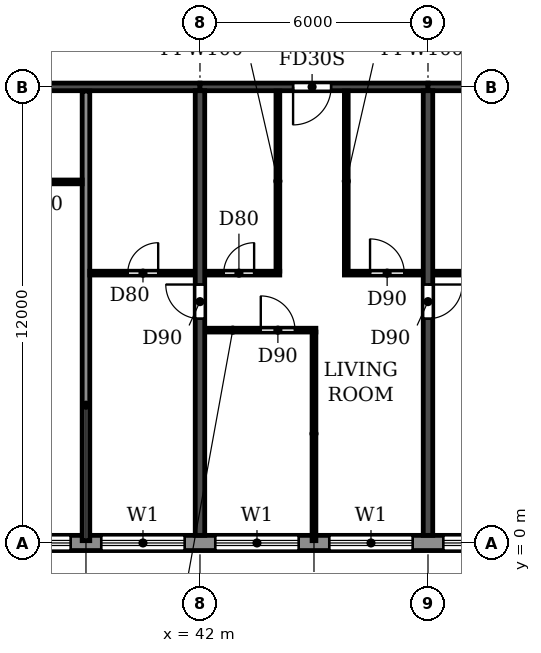
"""IFC4 building model, lengths in metres.
Left out: names, types, materials, properties, quantities, classifications, styles, units other than length and angle.
Written with IfcOpenShell. Run it as: python <this file> out.ifc"""

import sys

from ifc_helpers import new_model, si_unit, direction, frame, frame_2d, origin, place, context, subcontext, project, spatial, rectangle, extrude, element, fill, save


model = new_model("IFC4")
c1 = context("Model", 3, precision=1e-05, world=origin(), true_north=direction((0.0, 1.0)))
c2 = subcontext(c1, "Body", "Model", "MODEL_VIEW")
j1 = project(units=[si_unit("LENGTHUNIT", "METRE"), si_unit("PLANEANGLEUNIT", "RADIAN")], contexts=[c1])
p1 = place(None, origin())
s1 = spatial("IfcSite", under=j1, at=p1, CompositionType="ELEMENT")
p2 = place(p1, origin())
s2 = spatial("IfcBuilding", under=s1, at=p2, CompositionType="ELEMENT")
p3 = place(p2, frame((0.0, 0.0, 181.8)))
s3 = spatial("IfcBuildingStorey", under=s2, at=p3, CompositionType="ELEMENT", Elevation=181.8)
p4 = place(p3, frame((42.0, 0.2, 0.0), z_axis=(0.0, 0.0, 1.0), x_axis=(0.0, 1.0, 0.0)))
e1 = element("IfcWall", 1, at=p4, inside=s3, PredefinedType="SHEAR", context=c2, shape_type="SweptSolid", body=[
    extrude(rectangle(XDim=11.7, YDim=0.25, at=frame_2d((5.85, 0.0))), origin(), (0.0, 0.0, 1.0), 3.08),
])
p5 = place(p4, frame((5.7, 0.0, 0.0)))
e2 = element("IfcOpeningElement", 2, at=p5, cuts=e1, PredefinedType="OPENING", context=c2, shape_type="SweptSolid", body=[
    extrude(rectangle(XDim=0.9, YDim=2.1, at=frame_2d((0.45, 1.05))), frame((0.0, 0.135, 0.0), z_axis=(0.0, -1.0, 0.0), x_axis=(1.0, 0.0, 0.0)), (0.0, 0.0, 1.0), 0.27),
])
p6 = place(p3, frame((48.0, 0.2, 0.0), z_axis=(0.0, 0.0, 1.0), x_axis=(0.0, 1.0, 0.0)))
e3 = element("IfcWall", 3, at=p6, inside=s3, PredefinedType="SHEAR", context=c2, shape_type="SweptSolid", body=[
    extrude(rectangle(XDim=11.7, YDim=0.25, at=frame_2d((5.85, 0.0))), origin(), (0.0, 0.0, 1.0), 3.08),
])
p7 = place(p6, frame((5.7, 0.0, 0.0)))
e4 = element("IfcOpeningElement", 4, at=p7, cuts=e3, PredefinedType="OPENING", context=c2, shape_type="SweptSolid", body=[
    extrude(rectangle(XDim=0.9, YDim=2.1, at=frame_2d((0.45, 1.05))), frame((0.0, 0.135, 0.0), z_axis=(0.0, -1.0, 0.0), x_axis=(1.0, 0.0, 0.0)), (0.0, 0.0, 1.0), 0.27),
])
p8 = place(p3, frame((36.0, 12.0, 0.0), z_axis=(0.0, 0.0, 1.0), x_axis=(1.0, 0.0, 0.0)))
e5 = element("IfcWall", 5, at=p8, inside=s3, PredefinedType="SHEAR", context=c2, shape_type="SweptSolid", body=[
    extrude(rectangle(XDim=6.0, YDim=0.2, at=frame_2d((3.0, 0.0))), origin(), (0.0, 0.0, 1.0), 2.48),
])
p9 = place(p3, frame((42.0, 12.0, 0.0), z_axis=(0.0, 0.0, 1.0), x_axis=(1.0, 0.0, 0.0)))
e6 = element("IfcWall", 6, at=p9, inside=s3, PredefinedType="SHEAR", context=c2, shape_type="SweptSolid", body=[
    extrude(rectangle(XDim=6.0, YDim=0.2, at=frame_2d((3.0, 0.0))), origin(), (0.0, 0.0, 1.0), 2.48),
])
p10 = place(p9, frame((2.45, 0.0, 0.0)))
e7 = element("IfcOpeningElement", 7, at=p10, cuts=e6, PredefinedType="OPENING", context=c2, shape_type="SweptSolid", body=[
    extrude(rectangle(XDim=1.0, YDim=2.1, at=frame_2d((0.5, 1.05))), frame((0.0, 0.11, 0.0), z_axis=(0.0, -1.0, 0.0), x_axis=(1.0, 0.0, 0.0)), (0.0, 0.0, 1.0), 0.22),
])
p11 = place(p3, frame((48.0, 12.0, 0.0), z_axis=(0.0, 0.0, 1.0), x_axis=(1.0, 0.0, 0.0)))
e8 = element("IfcWall", 8, at=p11, inside=s3, PredefinedType="SHEAR", context=c2, shape_type="SweptSolid", body=[
    extrude(rectangle(XDim=6.0, YDim=0.2, at=frame_2d((3.0, 0.0))), origin(), (0.0, 0.0, 1.0), 2.48),
])
p12 = place(p3, frame((22.683, 0.0, 0.0), z_axis=(0.0, 0.0, 1.0), x_axis=(1.0, 0.0, 0.0)))
e9 = element("IfcWall", 9, at=p12, inside=s3, PredefinedType="STANDARD", context=c2, shape_type="SweptSolid", body=[
    extrude(rectangle(XDim=56.634, YDim=0.4, at=frame_2d((28.317, 0.0))), origin(), (0.0, 0.0, 1.0), 3.08),
])
p13 = place(p12, frame((1.717, 0.0, 0.9)))
e10 = element("IfcOpeningElement", 10, at=p13, cuts=e9, PredefinedType="OPENING", context=c2, shape_type="SweptSolid", body=[
    extrude(rectangle(XDim=2.2, YDim=1.5, at=frame_2d((1.1, 0.75))), frame((0.0, 0.21, 0.0), z_axis=(0.0, -1.0, 0.0), x_axis=(1.0, 0.0, 0.0)), (0.0, 0.0, 1.0), 0.42),
])
p14 = place(p12, frame((4.917, 0.0, 0.0)))
e11 = element("IfcOpeningElement", 11, at=p14, cuts=e9, PredefinedType="OPENING", context=c2, shape_type="SweptSolid", body=[
    extrude(rectangle(XDim=1.8, YDim=2.4, at=frame_2d((0.9, 1.2))), frame((0.0, 0.21, 0.0), z_axis=(0.0, -1.0, 0.0), x_axis=(1.0, 0.0, 0.0)), (0.0, 0.0, 1.0), 0.42),
])
p15 = place(p12, frame((7.717, 0.0, 0.9)))
e12 = element("IfcOpeningElement", 12, at=p15, cuts=e9, PredefinedType="OPENING", context=c2, shape_type="SweptSolid", body=[
    extrude(rectangle(XDim=2.2, YDim=1.5, at=frame_2d((1.1, 0.75))), frame((0.0, 0.21, 0.0), z_axis=(0.0, -1.0, 0.0), x_axis=(1.0, 0.0, 0.0)), (0.0, 0.0, 1.0), 0.42),
])
p16 = place(p12, frame((10.717, 0.0, 0.9)))
e13 = element("IfcOpeningElement", 13, at=p16, cuts=e9, PredefinedType="OPENING", context=c2, shape_type="SweptSolid", body=[
    extrude(rectangle(XDim=2.2, YDim=1.5, at=frame_2d((1.1, 0.75))), frame((0.0, 0.21, 0.0), z_axis=(0.0, -1.0, 0.0), x_axis=(1.0, 0.0, 0.0)), (0.0, 0.0, 1.0), 0.42),
])
p17 = place(p12, frame((13.717, 0.0, 0.9)))
e14 = element("IfcOpeningElement", 14, at=p17, cuts=e9, PredefinedType="OPENING", context=c2, shape_type="SweptSolid", body=[
    extrude(rectangle(XDim=2.2, YDim=1.5, at=frame_2d((1.1, 0.75))), frame((0.0, 0.21, 0.0), z_axis=(0.0, -1.0, 0.0), x_axis=(1.0, 0.0, 0.0)), (0.0, 0.0, 1.0), 0.42),
])
p18 = place(p12, frame((16.717, 0.0, 0.9)))
e15 = element("IfcOpeningElement", 15, at=p18, cuts=e9, PredefinedType="OPENING", context=c2, shape_type="SweptSolid", body=[
    extrude(rectangle(XDim=2.2, YDim=1.5, at=frame_2d((1.1, 0.75))), frame((0.0, 0.21, 0.0), z_axis=(0.0, -1.0, 0.0), x_axis=(1.0, 0.0, 0.0)), (0.0, 0.0, 1.0), 0.42),
])
p19 = place(p12, frame((19.717, 0.0, 0.9)))
e16 = element("IfcOpeningElement", 16, at=p19, cuts=e9, PredefinedType="OPENING", context=c2, shape_type="SweptSolid", body=[
    extrude(rectangle(XDim=2.2, YDim=1.5, at=frame_2d((1.1, 0.75))), frame((0.0, 0.21, 0.0), z_axis=(0.0, -1.0, 0.0), x_axis=(1.0, 0.0, 0.0)), (0.0, 0.0, 1.0), 0.42),
])
p20 = place(p12, frame((22.717, 0.0, 0.9)))
e17 = element("IfcOpeningElement", 17, at=p20, cuts=e9, PredefinedType="OPENING", context=c2, shape_type="SweptSolid", body=[
    extrude(rectangle(XDim=2.2, YDim=1.5, at=frame_2d((1.1, 0.75))), frame((0.0, 0.21, 0.0), z_axis=(0.0, -1.0, 0.0), x_axis=(1.0, 0.0, 0.0)), (0.0, 0.0, 1.0), 0.42),
])
p21 = place(p12, frame((25.717, 0.0, 0.9)))
e18 = element("IfcOpeningElement", 18, at=p21, cuts=e9, PredefinedType="OPENING", context=c2, shape_type="SweptSolid", body=[
    extrude(rectangle(XDim=2.2, YDim=1.5, at=frame_2d((1.1, 0.75))), frame((0.0, 0.21, 0.0), z_axis=(0.0, -1.0, 0.0), x_axis=(1.0, 0.0, 0.0)), (0.0, 0.0, 1.0), 0.42),
])
p22 = place(p12, frame((28.717, 0.0, 0.9)))
e19 = element("IfcOpeningElement", 19, at=p22, cuts=e9, PredefinedType="OPENING", context=c2, shape_type="SweptSolid", body=[
    extrude(rectangle(XDim=2.2, YDim=1.5, at=frame_2d((1.1, 0.75))), frame((0.0, 0.21, 0.0), z_axis=(0.0, -1.0, 0.0), x_axis=(1.0, 0.0, 0.0)), (0.0, 0.0, 1.0), 0.42),
])
p23 = place(p12, frame((31.717, 0.0, 0.9)))
e20 = element("IfcOpeningElement", 20, at=p23, cuts=e9, PredefinedType="OPENING", context=c2, shape_type="SweptSolid", body=[
    extrude(rectangle(XDim=2.2, YDim=1.5, at=frame_2d((1.1, 0.75))), frame((0.0, 0.21, 0.0), z_axis=(0.0, -1.0, 0.0), x_axis=(1.0, 0.0, 0.0)), (0.0, 0.0, 1.0), 0.42),
])
p24 = place(p12, frame((34.717, 0.0, 0.9)))
e21 = element("IfcOpeningElement", 21, at=p24, cuts=e9, PredefinedType="OPENING", context=c2, shape_type="SweptSolid", body=[
    extrude(rectangle(XDim=2.2, YDim=1.5, at=frame_2d((1.1, 0.75))), frame((0.0, 0.21, 0.0), z_axis=(0.0, -1.0, 0.0), x_axis=(1.0, 0.0, 0.0)), (0.0, 0.0, 1.0), 0.42),
])
p25 = place(p12, frame((37.917, 0.0, 0.0)))
e22 = element("IfcOpeningElement", 22, at=p25, cuts=e9, PredefinedType="OPENING", context=c2, shape_type="SweptSolid", body=[
    extrude(rectangle(XDim=1.8, YDim=2.4, at=frame_2d((0.9, 1.2))), frame((0.0, 0.21, 0.0), z_axis=(0.0, -1.0, 0.0), x_axis=(1.0, 0.0, 0.0)), (0.0, 0.0, 1.0), 0.42),
])
p26 = place(p12, frame((40.717, 0.0, 0.9)))
e23 = element("IfcOpeningElement", 23, at=p26, cuts=e9, PredefinedType="OPENING", context=c2, shape_type="SweptSolid", body=[
    extrude(rectangle(XDim=2.2, YDim=1.5, at=frame_2d((1.1, 0.75))), frame((0.0, 0.21, 0.0), z_axis=(0.0, -1.0, 0.0), x_axis=(1.0, 0.0, 0.0)), (0.0, 0.0, 1.0), 0.42),
])
p27 = place(p12, frame((43.717, 0.0, 0.9)))
e24 = element("IfcOpeningElement", 24, at=p27, cuts=e9, PredefinedType="OPENING", context=c2, shape_type="SweptSolid", body=[
    extrude(rectangle(XDim=2.2, YDim=1.5, at=frame_2d((1.1, 0.75))), frame((0.0, 0.21, 0.0), z_axis=(0.0, -1.0, 0.0), x_axis=(1.0, 0.0, 0.0)), (0.0, 0.0, 1.0), 0.42),
])
p28 = place(p12, frame((46.717, 0.0, 0.9)))
e25 = element("IfcOpeningElement", 25, at=p28, cuts=e9, PredefinedType="OPENING", context=c2, shape_type="SweptSolid", body=[
    extrude(rectangle(XDim=2.2, YDim=1.5, at=frame_2d((1.1, 0.75))), frame((0.0, 0.21, 0.0), z_axis=(0.0, -1.0, 0.0), x_axis=(1.0, 0.0, 0.0)), (0.0, 0.0, 1.0), 0.42),
])
p29 = place(p12, frame((49.917, 0.0, 0.0)))
e26 = element("IfcOpeningElement", 26, at=p29, cuts=e9, PredefinedType="OPENING", context=c2, shape_type="SweptSolid", body=[
    extrude(rectangle(XDim=1.8, YDim=2.4, at=frame_2d((0.9, 1.2))), frame((0.0, 0.21, 0.0), z_axis=(0.0, -1.0, 0.0), x_axis=(1.0, 0.0, 0.0)), (0.0, 0.0, 1.0), 0.42),
])
p30 = place(p12, frame((52.717, 0.0, 0.9)))
e27 = element("IfcOpeningElement", 27, at=p30, cuts=e9, PredefinedType="OPENING", context=c2, shape_type="SweptSolid", body=[
    extrude(rectangle(XDim=2.2, YDim=1.5, at=frame_2d((1.1, 0.75))), frame((0.0, 0.21, 0.0), z_axis=(0.0, -1.0, 0.0), x_axis=(1.0, 0.0, 0.0)), (0.0, 0.0, 1.0), 0.42),
])
p31 = place(p3, frame((39.0, 0.06, 0.0), z_axis=(0.0, 0.0, 1.0), x_axis=(0.0, 1.0, 0.0)))
e28 = element("IfcWall", 28, at=p31, inside=s3, PredefinedType="PARTITIONING", context=c2, shape_type="SweptSolid", body=[
    extrude(rectangle(XDim=11.83, YDim=0.2, at=frame_2d((5.915, 0.0))), origin(), (0.0, 0.0, 1.0), 3.08),
])
p32 = place(p3, frame((42.135, 5.6, 0.0), z_axis=(0.0, 0.0, 1.0), x_axis=(1.0, 0.0, 0.0)))
e29 = element("IfcWall", 29, at=p32, inside=s3, PredefinedType="PARTITIONING", context=c2, shape_type="SweptSolid", body=[
    extrude(rectangle(XDim=2.915, YDim=0.1, at=frame_2d((1.458, 0.0))), origin(), (0.0, 0.0, 1.0), 3.08),
])
p33 = place(p32, frame((1.465, 0.0, 0.0)))
e30 = element("IfcOpeningElement", 30, at=p33, cuts=e29, PredefinedType="OPENING", context=c2, shape_type="SweptSolid", body=[
    extrude(rectangle(XDim=0.9, YDim=2.1, at=frame_2d((0.45, 1.05))), frame((0.0, 0.06, 0.0), z_axis=(0.0, -1.0, 0.0), x_axis=(1.0, 0.0, 0.0)), (0.0, 0.0, 1.0), 0.12),
])
p34 = place(p3, frame((39.1, 7.1, 0.0), z_axis=(0.0, 0.0, 1.0), x_axis=(1.0, 0.0, 0.0)))
e31 = element("IfcWall", 31, at=p34, inside=s3, PredefinedType="PARTITIONING", context=c2, shape_type="SweptSolid", body=[
    extrude(rectangle(XDim=2.765, YDim=0.1, at=frame_2d((1.382, 0.0))), origin(), (0.0, 0.0, 1.0), 3.08),
])
p35 = place(p34, frame((1.0, 0.0, 0.0)))
e32 = element("IfcOpeningElement", 32, at=p35, cuts=e31, PredefinedType="OPENING", context=c2, shape_type="SweptSolid", body=[
    extrude(rectangle(XDim=0.8, YDim=2.1, at=frame_2d((0.4, 1.05))), frame((0.0, 0.06, 0.0), z_axis=(0.0, -1.0, 0.0), x_axis=(1.0, 0.0, 0.0)), (0.0, 0.0, 1.0), 0.12),
])
p36 = place(p3, frame((42.135, 7.1, 0.0), z_axis=(0.0, 0.0, 1.0), x_axis=(1.0, 0.0, 0.0)))
e33 = element("IfcWall", 33, at=p36, inside=s3, PredefinedType="PARTITIONING", context=c2, shape_type="SweptSolid", body=[
    extrude(rectangle(XDim=1.965, YDim=0.1, at=frame_2d((0.982, 0.0))), origin(), (0.0, 0.0, 1.0), 3.08),
])
p37 = place(p36, frame((0.49, 0.0, 0.0)))
e34 = element("IfcOpeningElement", 34, at=p37, cuts=e33, PredefinedType="OPENING", context=c2, shape_type="SweptSolid", body=[
    extrude(rectangle(XDim=0.8, YDim=2.1, at=frame_2d((0.4, 1.05))), frame((0.0, 0.06, 0.0), z_axis=(0.0, -1.0, 0.0), x_axis=(1.0, 0.0, 0.0)), (0.0, 0.0, 1.0), 0.12),
])
p38 = place(p3, frame((45.8, 7.1, 0.0), z_axis=(0.0, 0.0, 1.0), x_axis=(1.0, 0.0, 0.0)))
e35 = element("IfcWall", 35, at=p38, inside=s3, PredefinedType="PARTITIONING", context=c2, shape_type="SweptSolid", body=[
    extrude(rectangle(XDim=2.065, YDim=0.1, at=frame_2d((1.032, 0.0))), origin(), (0.0, 0.0, 1.0), 3.08),
])
p39 = place(p38, frame((0.675, 0.0, 0.0)))
e36 = element("IfcOpeningElement", 36, at=p39, cuts=e35, PredefinedType="OPENING", context=c2, shape_type="SweptSolid", body=[
    extrude(rectangle(XDim=0.9, YDim=2.1, at=frame_2d((0.45, 1.05))), frame((0.0, 0.06, 0.0), z_axis=(0.0, -1.0, 0.0), x_axis=(1.0, 0.0, 0.0)), (0.0, 0.0, 1.0), 0.12),
])
p40 = place(p3, frame((48.135, 7.1, 0.0), z_axis=(0.0, 0.0, 1.0), x_axis=(1.0, 0.0, 0.0)))
e37 = element("IfcWall", 37, at=p40, inside=s3, PredefinedType="PARTITIONING", context=c2, shape_type="SweptSolid", body=[
    extrude(rectangle(XDim=2.765, YDim=0.1, at=frame_2d((1.382, 0.0))), origin(), (0.0, 0.0, 1.0), 3.08),
])
p41 = place(p40, frame((0.965, 0.0, 0.0)))
e38 = element("IfcOpeningElement", 38, at=p41, cuts=e37, PredefinedType="OPENING", context=c2, shape_type="SweptSolid", body=[
    extrude(rectangle(XDim=0.8, YDim=2.1, at=frame_2d((0.4, 1.05))), frame((0.0, 0.06, 0.0), z_axis=(0.0, -1.0, 0.0), x_axis=(1.0, 0.0, 0.0)), (0.0, 0.0, 1.0), 0.12),
])
p42 = place(p3, frame((36.135, 9.5, 0.0), z_axis=(0.0, 0.0, 1.0), x_axis=(1.0, 0.0, 0.0)))
e39 = element("IfcWall", 39, at=p42, inside=s3, PredefinedType="PARTITIONING", context=c2, shape_type="SweptSolid", body=[
    extrude(rectangle(XDim=2.765, YDim=0.1, at=frame_2d((1.382, 0.0))), origin(), (0.0, 0.0, 1.0), 3.08),
])
p43 = place(p42, frame((0.965, 0.0, 0.0)))
e40 = element("IfcOpeningElement", 40, at=p43, cuts=e39, PredefinedType="OPENING", context=c2, shape_type="SweptSolid", body=[
    extrude(rectangle(XDim=0.8, YDim=2.1, at=frame_2d((0.4, 1.05))), frame((0.0, 0.06, 0.0), z_axis=(0.0, -1.0, 0.0), x_axis=(1.0, 0.0, 0.0)), (0.0, 0.0, 1.0), 0.12),
])
p44 = place(p3, frame((44.05, 7.15, 0.0), z_axis=(0.0, 0.0, 1.0), x_axis=(0.0, 1.0, 0.0)))
e41 = element("IfcWall", 41, at=p44, inside=s3, PredefinedType="PARTITIONING", context=c2, shape_type="SweptSolid", body=[
    extrude(rectangle(XDim=4.74, YDim=0.1, at=frame_2d((2.37, 0.0))), origin(), (0.0, 0.0, 1.0), 3.08),
])
p45 = place(p3, frame((45.0, 0.06, 0.0), z_axis=(0.0, 0.0, 1.0), x_axis=(0.0, 1.0, 0.0)))
e42 = element("IfcWall", 42, at=p45, inside=s3, PredefinedType="PARTITIONING", context=c2, shape_type="SweptSolid", body=[
    extrude(rectangle(XDim=5.49, YDim=0.1, at=frame_2d((2.745, 0.0))), origin(), (0.0, 0.0, 1.0), 3.08),
])
p46 = place(p3, frame((45.85, 7.15, 0.0), z_axis=(0.0, 0.0, 1.0), x_axis=(0.0, 1.0, 0.0)))
e43 = element("IfcWall", 43, at=p46, inside=s3, PredefinedType="PARTITIONING", context=c2, shape_type="SweptSolid", body=[
    extrude(rectangle(XDim=4.74, YDim=0.1, at=frame_2d((2.37, 0.0))), origin(), (0.0, 0.0, 1.0), 3.08),
])
p47 = place(p17, origin())
e44 = element("IfcWindow", 44, at=p47, inside=s3, PartitioningType="DOUBLE_PANEL_HORIZONTAL", PredefinedType="WINDOW", context=c2, shape_type="SweptSolid", body=[
    extrude(rectangle(XDim=2.2, YDim=1.5, at=frame_2d((1.1, 0.75))), frame((0.0, 0.03, 0.0), z_axis=(0.0, -1.0, 0.0), x_axis=(1.0, 0.0, 0.0)), (0.0, 0.0, 1.0), 0.06),
])
fill(e14, e44)
p48 = place(p18, origin())
e45 = element("IfcWindow", 45, at=p48, inside=s3, PartitioningType="DOUBLE_PANEL_HORIZONTAL", PredefinedType="WINDOW", context=c2, shape_type="SweptSolid", body=[
    extrude(rectangle(XDim=2.2, YDim=1.5, at=frame_2d((1.1, 0.75))), frame((0.0, 0.03, 0.0), z_axis=(0.0, -1.0, 0.0), x_axis=(1.0, 0.0, 0.0)), (0.0, 0.0, 1.0), 0.06),
])
fill(e15, e45)
p49 = place(p19, origin())
e46 = element("IfcWindow", 46, at=p49, inside=s3, PartitioningType="DOUBLE_PANEL_HORIZONTAL", PredefinedType="WINDOW", context=c2, shape_type="SweptSolid", body=[
    extrude(rectangle(XDim=2.2, YDim=1.5, at=frame_2d((1.1, 0.75))), frame((0.0, 0.03, 0.0), z_axis=(0.0, -1.0, 0.0), x_axis=(1.0, 0.0, 0.0)), (0.0, 0.0, 1.0), 0.06),
])
fill(e16, e46)
p50 = place(p20, origin())
e47 = element("IfcWindow", 47, at=p50, inside=s3, PartitioningType="DOUBLE_PANEL_HORIZONTAL", PredefinedType="WINDOW", context=c2, shape_type="SweptSolid", body=[
    extrude(rectangle(XDim=2.2, YDim=1.5, at=frame_2d((1.1, 0.75))), frame((0.0, 0.03, 0.0), z_axis=(0.0, -1.0, 0.0), x_axis=(1.0, 0.0, 0.0)), (0.0, 0.0, 1.0), 0.06),
])
fill(e17, e47)
p51 = place(p21, origin())
e48 = element("IfcWindow", 48, at=p51, inside=s3, PartitioningType="DOUBLE_PANEL_HORIZONTAL", PredefinedType="WINDOW", context=c2, shape_type="SweptSolid", body=[
    extrude(rectangle(XDim=2.2, YDim=1.5, at=frame_2d((1.1, 0.75))), frame((0.0, 0.03, 0.0), z_axis=(0.0, -1.0, 0.0), x_axis=(1.0, 0.0, 0.0)), (0.0, 0.0, 1.0), 0.06),
])
fill(e18, e48)
p52 = place(p35, origin())
e49 = element("IfcDoor", 49, at=p52, inside=s3, OperationType="SINGLE_SWING_RIGHT", PredefinedType="DOOR", context=c2, shape_type="SweptSolid", body=[
    extrude(rectangle(XDim=0.8, YDim=2.1, at=frame_2d((0.4, 1.05))), frame((0.0, 0.025, 0.0), z_axis=(0.0, -1.0, 0.0), x_axis=(1.0, 0.0, 0.0)), (0.0, 0.0, 1.0), 0.05),
])
fill(e32, e49)
p53 = place(p5, origin())
e50 = element("IfcDoor", 50, at=p53, inside=s3, OperationType="SINGLE_SWING_RIGHT", PredefinedType="DOOR", context=c2, shape_type="SweptSolid", body=[
    extrude(rectangle(XDim=0.9, YDim=2.1, at=frame_2d((0.45, 1.05))), frame((0.0, 0.025, 0.0), z_axis=(0.0, -1.0, 0.0), x_axis=(1.0, 0.0, 0.0)), (0.0, 0.0, 1.0), 0.05),
])
fill(e2, e50)
p54 = place(p37, origin())
e51 = element("IfcDoor", 51, at=p54, inside=s3, OperationType="SINGLE_SWING_RIGHT", PredefinedType="DOOR", context=c2, shape_type="SweptSolid", body=[
    extrude(rectangle(XDim=0.8, YDim=2.1, at=frame_2d((0.4, 1.05))), frame((0.0, 0.025, 0.0), z_axis=(0.0, -1.0, 0.0), x_axis=(1.0, 0.0, 0.0)), (0.0, 0.0, 1.0), 0.05),
])
fill(e34, e51)
p55 = place(p33, origin())
e52 = element("IfcDoor", 52, at=p55, inside=s3, OperationType="SINGLE_SWING_LEFT", PredefinedType="DOOR", context=c2, shape_type="SweptSolid", body=[
    extrude(rectangle(XDim=0.9, YDim=2.1, at=frame_2d((0.45, 1.05))), frame((0.0, 0.025, 0.0), z_axis=(0.0, -1.0, 0.0), x_axis=(1.0, 0.0, 0.0)), (0.0, 0.0, 1.0), 0.05),
])
fill(e30, e52)
p56 = place(p10, frame((1.0, 0.0, 0.0), z_axis=(0.0, 0.0, 1.0), x_axis=(-1.0, 0.0, 0.0)))
e53 = element("IfcDoor", 53, at=p56, inside=s3, OperationType="SINGLE_SWING_RIGHT", PredefinedType="DOOR", context=c2, shape_type="SweptSolid", body=[
    extrude(rectangle(XDim=1.0, YDim=2.1, at=frame_2d((0.5, 1.05))), frame((0.0, 0.025, 0.0), z_axis=(0.0, -1.0, 0.0), x_axis=(1.0, 0.0, 0.0)), (0.0, 0.0, 1.0), 0.05),
])
fill(e7, e53)
p57 = place(p39, origin())
e54 = element("IfcDoor", 54, at=p57, inside=s3, OperationType="SINGLE_SWING_LEFT", PredefinedType="DOOR", context=c2, shape_type="SweptSolid", body=[
    extrude(rectangle(XDim=0.9, YDim=2.1, at=frame_2d((0.45, 1.05))), frame((0.0, 0.025, 0.0), z_axis=(0.0, -1.0, 0.0), x_axis=(1.0, 0.0, 0.0)), (0.0, 0.0, 1.0), 0.05),
])
fill(e36, e54)
p58 = place(p7, frame((0.9, 0.0, 0.0), z_axis=(0.0, 0.0, 1.0), x_axis=(-1.0, 0.0, 0.0)))
e55 = element("IfcDoor", 55, at=p58, inside=s3, OperationType="SINGLE_SWING_LEFT", PredefinedType="DOOR", context=c2, shape_type="SweptSolid", body=[
    extrude(rectangle(XDim=0.9, YDim=2.1, at=frame_2d((0.45, 1.05))), frame((0.0, 0.025, 0.0), z_axis=(0.0, -1.0, 0.0), x_axis=(1.0, 0.0, 0.0)), (0.0, 0.0, 1.0), 0.05),
])
fill(e4, e55)
save(model, sys.argv[1])
